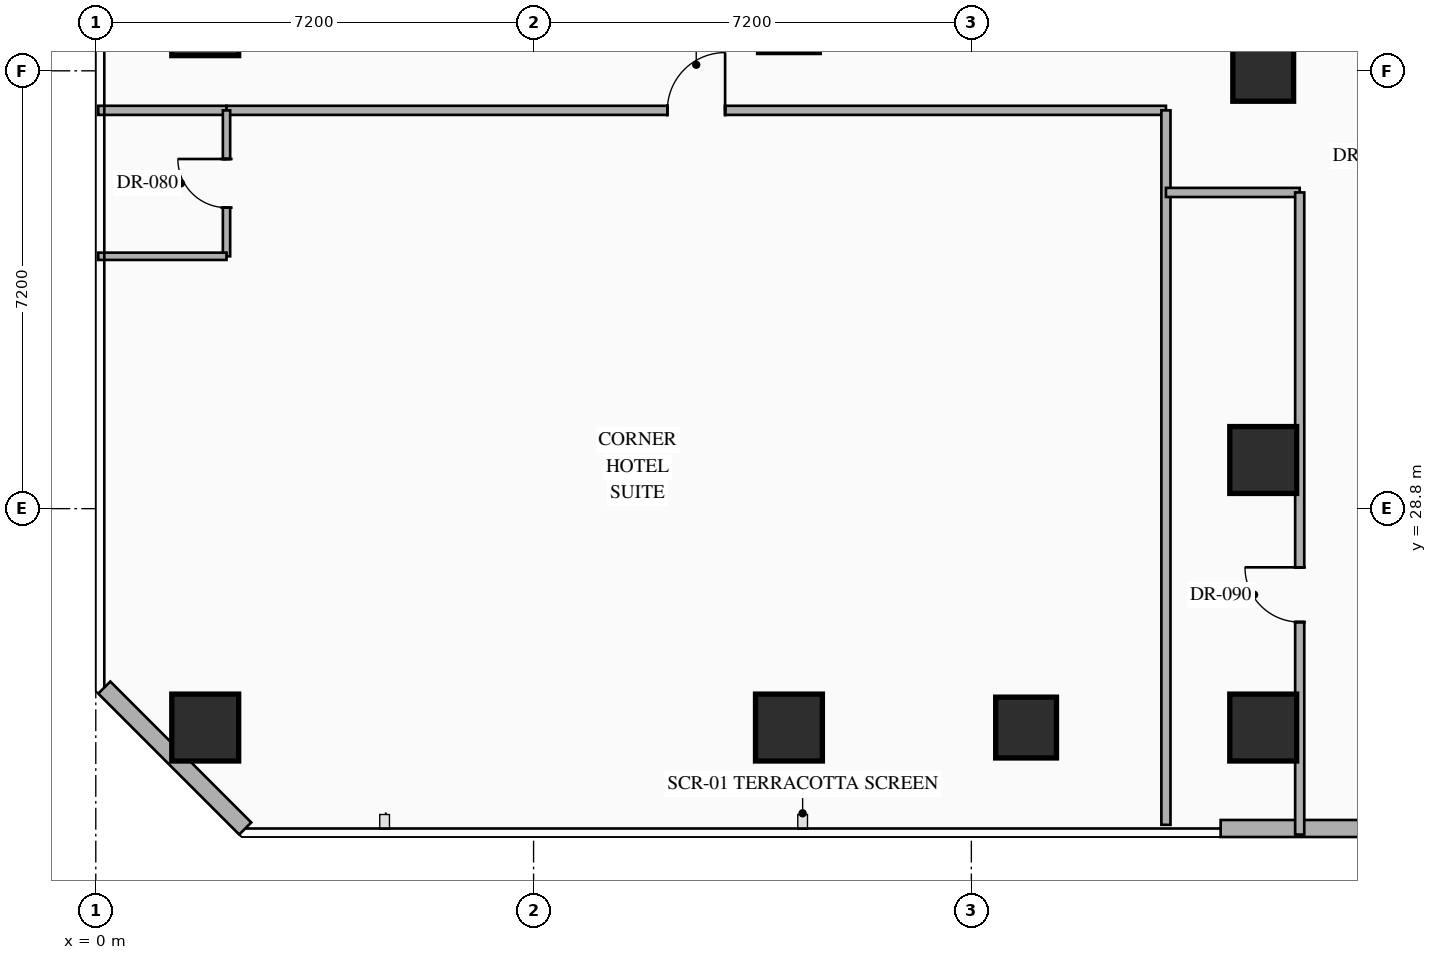
"""IFC4 building model, lengths in metres.
Left out: names, types, materials, properties, quantities, classifications, styles, units other than length and angle.
Written with IfcOpenShell. Run it as: python <this file> out.ifc"""

import sys

from ifc_helpers import new_model, si_unit, direction, frame, frame_2d, origin, origin_2d, place, context, subcontext, project, spatial, rectangle, hollow_rectangle, extrude, element, fill, save


model = new_model("IFC4")
c1 = context("Model", 3, precision=1e-05, world=origin(), true_north=direction((0.0, 1.0)))
c2 = subcontext(c1, "Body", "Model", "MODEL_VIEW")
j1 = project(units=[si_unit("LENGTHUNIT", "METRE"), si_unit("PLANEANGLEUNIT", "RADIAN")], contexts=[c1])
p1 = place(None, origin())
s1 = spatial("IfcSite", under=j1, at=p1, CompositionType="ELEMENT")
p2 = place(p1, origin())
s2 = spatial("IfcBuilding", under=s1, at=p2, CompositionType="ELEMENT")
p3 = place(p2, frame((0.0, 0.0, 56.7)))
s3 = spatial("IfcBuildingStorey", under=s2, at=p3, CompositionType="ELEMENT", Elevation=56.7)
for number, where, z_axis, x_axis in (
    (1, (1.8, 25.2, 0.0), (0.0, 0.0, 1.0), (1.0, 0.0, 0.0)),
    (2, (1.8, 36.8, 0.0), (0.0, 0.0, 1.0), (1.0, 0.0, 0.0)),
    (3, (11.4, 25.2, 0.0), (0.0, 0.0, 1.0), (1.0, 0.0, 0.0)),
    (4, (19.2, 25.2, 0.0), (0.0, 0.0, 1.0), (1.0, 0.0, 0.0)),
    (5, (19.2, 29.6, 0.0), (0.0, 0.0, 1.0), (1.0, 0.0, 0.0)),
):
    element("IfcColumn", number, at=place(p3, frame(where, z_axis=z_axis, x_axis=x_axis)), inside=s3, PredefinedType="COLUMN", context=c2, shape_type="SweptSolid", body=[
        extrude(hollow_rectangle(XDim=1.1, YDim=1.1, WallThickness=0.04, at=origin_2d()), origin(), (0.0, 0.0, 1.0), 3.35),
    ])
for number, where, z_axis, x_axis in (
    (6, (19.2, 36.0, 0.0), (0.0, 0.0, 1.0), (1.0, 0.0, 0.0)),
    (7, (15.3, 25.2, 0.0), (0.0, 0.0, 1.0), (1.0, 0.0, 0.0)),
):
    element("IfcColumn", number, at=place(p3, frame(where, z_axis=z_axis, x_axis=x_axis)), inside=s3, PredefinedType="COLUMN", context=c2, shape_type="SweptSolid", body=[
        extrude(hollow_rectangle(XDim=1.0, YDim=1.0, WallThickness=0.038, at=origin_2d()), origin(), (0.0, 0.0, 1.0), 3.35),
    ])
p4 = place(p3, frame((25.247, 23.54, 0.0), z_axis=(0.0, 0.0, 1.0), x_axis=(-1.0, 0.0, 0.0)))
e8 = element("IfcWall", 8, at=p4, inside=s3, PredefinedType="STANDARD", context=c2, shape_type="SweptSolid", body=[
    extrude(rectangle(XDim=6.747, YDim=0.28, at=frame_2d((3.374, 0.0))), origin(), (0.0, 0.0, 1.0), 3.13),
])
p5 = place(p3, frame((2.458, 23.54, 0.0), z_axis=(0.0, 0.0, 1.0), x_axis=(-0.707144017911, 0.707069542501, 0.0)))
e9 = element("IfcWall", 9, at=p5, inside=s3, PredefinedType="STANDARD", context=c2, shape_type="SweptSolid", body=[
    extrude(rectangle(XDim=3.278, YDim=0.28, at=frame_2d((1.639, 0.0))), origin(), (0.0, 0.0, 1.0), 3.13),
])
p6 = place(p3, frame((0.04, 35.35, 0.0), z_axis=(0.0, 0.0, 1.0), x_axis=(1.0, 0.0, 0.0)))
e10 = element("IfcWall", 10, at=p6, inside=s3, PredefinedType="PARTITIONING", context=c2, shape_type="SweptSolid", body=[
    extrude(rectangle(XDim=2.11, YDim=0.15, at=frame_2d((1.055, 0.0))), origin(), (0.0, 0.0, 1.0), 3.13),
])
p7 = place(p3, frame((2.15, 35.35, 0.0), z_axis=(0.0, 0.0, 1.0), x_axis=(1.0, 0.0, 0.0)))
e11 = element("IfcWall", 11, at=p7, inside=s3, PredefinedType="PARTITIONING", context=c2, shape_type="SweptSolid", body=[
    extrude(rectangle(XDim=15.45, YDim=0.15, at=frame_2d((7.725, 0.0))), origin(), (0.0, 0.0, 1.0), 3.13),
])
p8 = place(p7, frame((7.25, 0.0, 0.0)))
e12 = element("IfcOpeningElement", 12, at=p8, cuts=e11, PredefinedType="OPENING", context=c2, shape_type="SweptSolid", body=[
    extrude(rectangle(XDim=0.95, YDim=2.15, at=frame_2d((0.475, 1.075))), frame((0.0, 0.085, 0.0), z_axis=(0.0, -1.0, 0.0), x_axis=(1.0, 0.0, 0.0)), (0.0, 0.0, 1.0), 0.17),
])
p9 = place(p3, frame((2.15, 32.95, 0.0), z_axis=(0.0, 0.0, 1.0), x_axis=(0.0, 1.0, 0.0)))
e13 = element("IfcWall", 13, at=p9, inside=s3, PredefinedType="PARTITIONING", context=c2, shape_type="SweptSolid", body=[
    extrude(rectangle(XDim=2.4, YDim=0.12, at=frame_2d((1.2, 0.0))), origin(), (0.0, 0.0, 1.0), 3.13),
])
p10 = place(p9, frame((0.8, 0.0, 0.0)))
e14 = element("IfcOpeningElement", 14, at=p10, cuts=e13, PredefinedType="OPENING", context=c2, shape_type="SweptSolid", body=[
    extrude(rectangle(XDim=0.8, YDim=2.06, at=frame_2d((0.4, 1.03))), frame((0.0, 0.07, 0.0), z_axis=(0.0, -1.0, 0.0), x_axis=(1.0, 0.0, 0.0)), (0.0, 0.0, 1.0), 0.14),
])
p11 = place(p3, frame((0.04, 32.95, 0.0), z_axis=(0.0, 0.0, 1.0), x_axis=(1.0, 0.0, 0.0)))
e15 = element("IfcWall", 15, at=p11, inside=s3, PredefinedType="PARTITIONING", context=c2, shape_type="SweptSolid", body=[
    extrude(rectangle(XDim=2.11, YDim=0.12, at=frame_2d((1.055, 0.0))), origin(), (0.0, 0.0, 1.0), 3.13),
])
p12 = place(p3, frame((17.6, 23.6, 0.0), z_axis=(0.0, 0.0, 1.0), x_axis=(0.0, 1.0, 0.0)))
e16 = element("IfcWall", 16, at=p12, inside=s3, PredefinedType="PARTITIONING", context=c2, shape_type="SweptSolid", body=[
    extrude(rectangle(XDim=11.75, YDim=0.15, at=frame_2d((5.875, 0.0))), origin(), (0.0, 0.0, 1.0), 3.13),
])
p13 = place(p3, frame((17.6, 34.0, 0.0), z_axis=(0.0, 0.0, 1.0), x_axis=(1.0, 0.0, 0.0)))
e17 = element("IfcWall", 17, at=p13, inside=s3, PredefinedType="PARTITIONING", context=c2, shape_type="SweptSolid", body=[
    extrude(rectangle(XDim=2.2, YDim=0.15, at=frame_2d((1.1, 0.0))), origin(), (0.0, 0.0, 1.0), 3.13),
])
p14 = place(p3, frame((19.8, 23.44, 0.0), z_axis=(0.0, 0.0, 1.0), x_axis=(0.0, 1.0, 0.0)))
e18 = element("IfcWall", 18, at=p14, inside=s3, PredefinedType="PARTITIONING", context=c2, shape_type="SweptSolid", body=[
    extrude(rectangle(XDim=10.56, YDim=0.15, at=frame_2d((5.28, 0.0))), origin(), (0.0, 0.0, 1.0), 3.13),
])
p15 = place(p14, frame((3.495, 0.0, 0.0)))
e19 = element("IfcOpeningElement", 19, at=p15, cuts=e18, PredefinedType="OPENING", context=c2, shape_type="SweptSolid", body=[
    extrude(rectangle(XDim=0.9, YDim=2.15, at=frame_2d((0.45, 1.075))), frame((0.0, 0.085, 0.0), z_axis=(0.0, -1.0, 0.0), x_axis=(1.0, 0.0, 0.0)), (0.0, 0.0, 1.0), 0.17),
])
p16 = place(p8, origin())
e20 = element("IfcDoor", 20, at=p16, inside=s3, OperationType="SINGLE_SWING_RIGHT", PredefinedType="DOOR", context=c2, shape_type="SweptSolid", body=[
    extrude(rectangle(XDim=0.95, YDim=2.15, at=frame_2d((0.475, 1.075))), frame((0.0, 0.025, 0.0), z_axis=(0.0, -1.0, 0.0), x_axis=(1.0, 0.0, 0.0)), (0.0, 0.0, 1.0), 0.05),
])
fill(e12, e20)
p17 = place(p10, origin())
e21 = element("IfcDoor", 21, at=p17, inside=s3, OperationType="SINGLE_SWING_RIGHT", PredefinedType="DOOR", context=c2, shape_type="SweptSolid", body=[
    extrude(rectangle(XDim=0.8, YDim=2.06, at=frame_2d((0.4, 1.03))), frame((0.0, 0.025, 0.0), z_axis=(0.0, -1.0, 0.0), x_axis=(1.0, 0.0, 0.0)), (0.0, 0.0, 1.0), 0.05),
])
fill(e14, e21)
p18 = place(p15, origin())
e22 = element("IfcDoor", 22, at=p18, inside=s3, OperationType="SINGLE_SWING_RIGHT", PredefinedType="DOOR", context=c2, shape_type="SweptSolid", body=[
    extrude(rectangle(XDim=0.9, YDim=2.15, at=frame_2d((0.45, 1.075))), frame((0.0, 0.025, 0.0), z_axis=(0.0, -1.0, 0.0), x_axis=(1.0, 0.0, 0.0)), (0.0, 0.0, 1.0), 0.05),
])
fill(e19, e22)
save(model, sys.argv[1])
